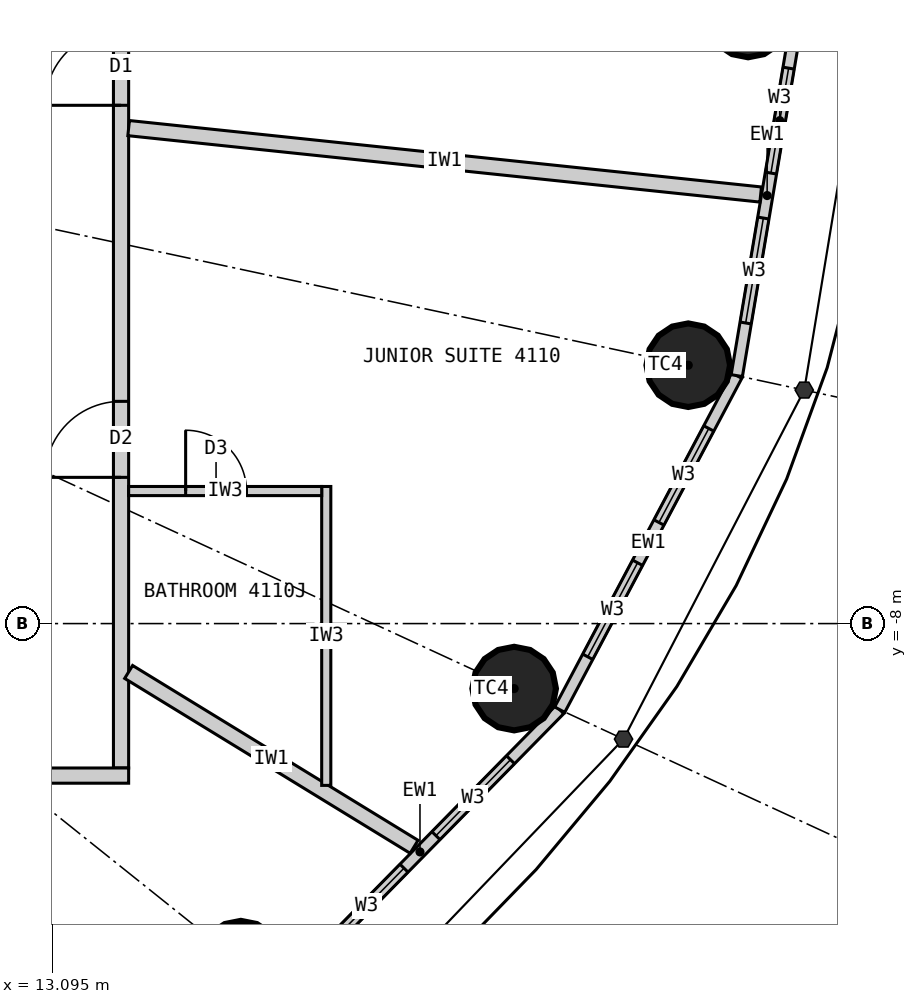
"""IFC4 building model, lengths in metres.
Left out: names, types, materials, properties, quantities, classifications, styles, units other than length and angle.
Written with IfcOpenShell. Run it as: python <this file> out.ifc"""

import sys

from ifc_helpers import new_model, si_unit, direction, frame, frame_2d, origin, origin_2d, place, context, subcontext, project, spatial, rectangle, circle, extrude, element, fill, save


model = new_model("IFC4")
c1 = context("Model", 3, precision=1e-05, world=origin(), true_north=direction((0.0, 1.0)))
c2 = subcontext(c1, "Body", "Model", "MODEL_VIEW")
j1 = project(units=[si_unit("LENGTHUNIT", "METRE"), si_unit("PLANEANGLEUNIT", "RADIAN")], contexts=[c1])
p1 = place(None, origin())
s1 = spatial("IfcSite", under=j1, at=p1, CompositionType="ELEMENT")
p2 = place(p1, origin())
s2 = spatial("IfcBuilding", under=s1, at=p2, CompositionType="ELEMENT")
p3 = place(p2, frame((0.0, 0.0, 156.6)))
s3 = spatial("IfcBuildingStorey", under=s2, at=p3, CompositionType="ELEMENT", Elevation=156.6)
for number, where, z_axis, x_axis in (
    (1, (22.25, 0.0, 0.0), (0.0, 0.0, 1.0), (1.0, 0.0, 0.0)),
    (2, (15.576, -12.461, 0.0), (0.0, 0.0, 1.0), (1.0, 0.0, 0.0)),
    (3, (19.172, -8.855, 0.0), (0.0, 0.0, 1.0), (1.0, 0.0, 0.0)),
    (4, (21.463, -4.601, 0.0), (0.0, 0.0, 1.0), (1.0, 0.0, 0.0)),
):
    element("IfcColumn", number, at=place(p3, frame(where, z_axis=z_axis, x_axis=x_axis)), inside=s3, PredefinedType="COLUMN", context=c2, shape_type="SweptSolid", body=[
        extrude(circle(Radius=0.55, at=origin_2d()), origin(), (0.0, 0.0, 1.0), 3.3),
    ])
p4 = place(p3, frame((16.095, -12.876, 0.0), z_axis=(0.0, 0.0, 1.0), x_axis=(0.700727467776, 0.71342905457, 0.0)))
e5 = element("IfcWall", 5, at=p4, inside=s3, PredefinedType="ELEMENTEDWALL", context=c2, shape_type="SweptSolid", body=[
    extrude(rectangle(XDim=5.247, YDim=0.15, at=frame_2d((2.624, 0.0))), origin(), (0.0, 0.0, 1.0), 3.12),
])
p5 = place(p4, frame((0.924, 0.0, 0.9)))
e6 = element("IfcOpeningElement", 6, at=p5, cuts=e5, PredefinedType="OPENING", context=c2, shape_type="SweptSolid", body=[
    extrude(rectangle(XDim=1.4, YDim=1.9, at=frame_2d((0.7, 0.95))), frame((0.0, 0.085, 0.0), z_axis=(0.0, -1.0, 0.0), x_axis=(1.0, 0.0, 0.0)), (0.0, 0.0, 1.0), 0.17),
])
p6 = place(p4, frame((2.924, 0.0, 0.9)))
e7 = element("IfcOpeningElement", 7, at=p6, cuts=e5, PredefinedType="OPENING", context=c2, shape_type="SweptSolid", body=[
    extrude(rectangle(XDim=1.4, YDim=1.9, at=frame_2d((0.7, 0.95))), frame((0.0, 0.085, 0.0), z_axis=(0.0, -1.0, 0.0), x_axis=(1.0, 0.0, 0.0)), (0.0, 0.0, 1.0), 0.17),
])
p7 = place(p3, frame((19.772, -9.132, 0.0), z_axis=(0.0, 0.0, 1.0), x_axis=(0.468428906714, 0.883501193748, 0.0)))
e8 = element("IfcWall", 8, at=p7, inside=s3, PredefinedType="ELEMENTEDWALL", context=c2, shape_type="SweptSolid", body=[
    extrude(rectangle(XDim=4.974, YDim=0.15, at=frame_2d((2.487, 0.0))), origin(), (0.0, 0.0, 1.0), 3.12),
])
p8 = place(p7, frame((0.787, 0.0, 0.9)))
e9 = element("IfcOpeningElement", 9, at=p8, cuts=e8, PredefinedType="OPENING", context=c2, shape_type="SweptSolid", body=[
    extrude(rectangle(XDim=1.4, YDim=1.9, at=frame_2d((0.7, 0.95))), frame((0.0, 0.085, 0.0), z_axis=(0.0, -1.0, 0.0), x_axis=(1.0, 0.0, 0.0)), (0.0, 0.0, 1.0), 0.17),
])
p9 = place(p7, frame((2.787, 0.0, 0.9)))
e10 = element("IfcOpeningElement", 10, at=p9, cuts=e8, PredefinedType="OPENING", context=c2, shape_type="SweptSolid", body=[
    extrude(rectangle(XDim=1.4, YDim=1.9, at=frame_2d((0.7, 0.95))), frame((0.0, 0.085, 0.0), z_axis=(0.0, -1.0, 0.0), x_axis=(1.0, 0.0, 0.0)), (0.0, 0.0, 1.0), 0.17),
])
p10 = place(p3, frame((22.102, -4.738, 0.0), z_axis=(0.0, 0.0, 1.0), x_axis=(0.166162111254, 0.986098449843, 0.0)))
e11 = element("IfcWall", 11, at=p10, inside=s3, PredefinedType="ELEMENTEDWALL", context=c2, shape_type="SweptSolid", body=[
    extrude(rectangle(XDim=4.805, YDim=0.15, at=frame_2d((2.402, 0.0))), origin(), (0.0, 0.0, 1.0), 3.12),
])
p11 = place(p10, frame((0.702, 0.0, 0.9)))
e12 = element("IfcOpeningElement", 12, at=p11, cuts=e11, PredefinedType="OPENING", context=c2, shape_type="SweptSolid", body=[
    extrude(rectangle(XDim=1.4, YDim=1.9, at=frame_2d((0.7, 0.95))), frame((0.0, 0.085, 0.0), z_axis=(0.0, -1.0, 0.0), x_axis=(1.0, 0.0, 0.0)), (0.0, 0.0, 1.0), 0.17),
])
p12 = place(p10, frame((2.702, 0.0, 0.9)))
e13 = element("IfcOpeningElement", 13, at=p12, cuts=e11, PredefinedType="OPENING", context=c2, shape_type="SweptSolid", body=[
    extrude(rectangle(XDim=1.4, YDim=1.9, at=frame_2d((0.7, 0.95))), frame((0.0, 0.085, 0.0), z_axis=(0.0, -1.0, 0.0), x_axis=(1.0, 0.0, 0.0)), (0.0, 0.0, 1.0), 0.17),
])
p13 = place(p3, frame((14.0, -9.9, 0.0), z_axis=(0.0, 0.0, 1.0), x_axis=(0.0, 1.0, 0.0)))
e14 = element("IfcWall", 14, at=p13, inside=s3, PredefinedType="PARTITIONING", context=c2, shape_type="SweptSolid", body=[
    extrude(rectangle(XDim=19.8, YDim=0.2, at=frame_2d((9.9, 0.0))), origin(), (0.0, 0.0, 1.0), 3.12),
])
p14 = place(p13, frame((3.824, 0.0, 0.0)))
e15 = element("IfcOpeningElement", 15, at=p14, cuts=e14, PredefinedType="OPENING", context=c2, shape_type="SweptSolid", body=[
    extrude(rectangle(XDim=1.0, YDim=2.2, at=frame_2d((0.5, 1.1))), frame((0.0, 0.11, 0.0), z_axis=(0.0, -1.0, 0.0), x_axis=(1.0, 0.0, 0.0)), (0.0, 0.0, 1.0), 0.22),
])
p15 = place(p13, frame((8.719, 0.0, 0.0)))
e16 = element("IfcOpeningElement", 16, at=p15, cuts=e14, PredefinedType="OPENING", context=c2, shape_type="SweptSolid", body=[
    extrude(rectangle(XDim=1.0, YDim=2.2, at=frame_2d((0.5, 1.1))), frame((0.0, 0.11, 0.0), z_axis=(0.0, -1.0, 0.0), x_axis=(1.0, 0.0, 0.0)), (0.0, 0.0, 1.0), 0.22),
])
p16 = place(p13, frame((15.482, 0.0, 0.0)))
e17 = element("IfcOpeningElement", 17, at=p16, cuts=e14, PredefinedType="OPENING", context=c2, shape_type="SweptSolid", body=[
    extrude(rectangle(XDim=1.0, YDim=2.2, at=frame_2d((0.5, 1.1))), frame((0.0, 0.11, 0.0), z_axis=(0.0, -1.0, 0.0), x_axis=(1.0, 0.0, 0.0)), (0.0, 0.0, 1.0), 0.22),
])
p17 = place(p3, frame((14.1, -8.636, 0.0), z_axis=(0.0, 0.0, 1.0), x_axis=(0.852731884196, -0.522348862041, 0.0)))
e18 = element("IfcWall", 18, at=p17, inside=s3, PredefinedType="PARTITIONING", context=c2, shape_type="SweptSolid", body=[
    extrude(rectangle(XDim=4.404, YDim=0.2, at=frame_2d((2.202, 0.0))), origin(), (0.0, 0.0, 1.0), 3.12),
])
p18 = place(p3, frame((14.1, -1.481, 0.0), z_axis=(0.0, 0.0, 1.0), x_axis=(0.994524794819, -0.104500873159, 0.0)))
e19 = element("IfcWall", 19, at=p18, inside=s3, PredefinedType="PARTITIONING", context=c2, shape_type="SweptSolid", body=[
    extrude(rectangle(XDim=8.362, YDim=0.2, at=frame_2d((4.181, 0.0))), origin(), (0.0, 0.0, 1.0), 2.47),
])
p19 = place(p3, frame((16.7, -10.129, 0.0), z_axis=(0.0, 0.0, 1.0), x_axis=(0.0, 1.0, 0.0)))
e20 = element("IfcWall", 20, at=p19, inside=s3, PredefinedType="PARTITIONING", context=c2, shape_type="SweptSolid", body=[
    extrude(rectangle(XDim=3.933, YDim=0.12, at=frame_2d((1.966, 0.0))), origin(), (0.0, 0.0, 1.0), 3.12),
])
p20 = place(p3, frame((14.1, -6.256, 0.0), z_axis=(0.0, 0.0, 1.0), x_axis=(1.0, 0.0, 0.0)))
e21 = element("IfcWall", 21, at=p20, inside=s3, PredefinedType="PARTITIONING", context=c2, shape_type="SweptSolid", body=[
    extrude(rectangle(XDim=2.54, YDim=0.12, at=frame_2d((1.27, 0.0))), origin(), (0.0, 0.0, 1.0), 3.12),
])
p21 = place(p20, frame((0.75, 0.0, 0.0)))
e22 = element("IfcOpeningElement", 22, at=p21, cuts=e21, PredefinedType="OPENING", context=c2, shape_type="SweptSolid", body=[
    extrude(rectangle(XDim=0.8, YDim=2.1, at=frame_2d((0.4, 1.05))), frame((0.0, 0.07, 0.0), z_axis=(0.0, -1.0, 0.0), x_axis=(1.0, 0.0, 0.0)), (0.0, 0.0, 1.0), 0.14),
])
p22 = place(p3, frame((14.1, -10.0, 0.0), z_axis=(0.0, 0.0, 1.0), x_axis=(-1.0, 0.0, 0.0)))
e23 = element("IfcWall", 23, at=p22, inside=s3, PredefinedType="PARTITIONING", context=c2, shape_type="SweptSolid", body=[
    extrude(rectangle(XDim=12.43, YDim=0.2, at=frame_2d((6.215, 0.0))), origin(), (0.0, 0.0, 1.0), 3.12),
])
p23 = place(p22, frame((5.25, 0.0, 0.0)))
e24 = element("IfcOpeningElement", 24, at=p23, cuts=e23, PredefinedType="OPENING", context=c2, shape_type="SweptSolid", body=[
    extrude(rectangle(XDim=1.0, YDim=2.2, at=frame_2d((0.5, 1.1))), frame((0.0, 0.11, 0.0), z_axis=(0.0, -1.0, 0.0), x_axis=(1.0, 0.0, 0.0)), (0.0, 0.0, 1.0), 0.22),
])
p24 = place(p5, origin())
e25 = element("IfcWindow", 25, at=p24, inside=s3, PartitioningType="SINGLE_PANEL", PredefinedType="WINDOW", context=c2, shape_type="SweptSolid", body=[
    extrude(rectangle(XDim=1.4, YDim=1.9, at=frame_2d((0.7, 0.95))), frame((0.0, 0.03, 0.0), z_axis=(0.0, -1.0, 0.0), x_axis=(1.0, 0.0, 0.0)), (0.0, 0.0, 1.0), 0.06),
])
fill(e6, e25)
p25 = place(p6, origin())
e26 = element("IfcWindow", 26, at=p25, inside=s3, PartitioningType="SINGLE_PANEL", PredefinedType="WINDOW", context=c2, shape_type="SweptSolid", body=[
    extrude(rectangle(XDim=1.4, YDim=1.9, at=frame_2d((0.7, 0.95))), frame((0.0, 0.03, 0.0), z_axis=(0.0, -1.0, 0.0), x_axis=(1.0, 0.0, 0.0)), (0.0, 0.0, 1.0), 0.06),
])
fill(e7, e26)
p26 = place(p8, origin())
e27 = element("IfcWindow", 27, at=p26, inside=s3, PartitioningType="SINGLE_PANEL", PredefinedType="WINDOW", context=c2, shape_type="SweptSolid", body=[
    extrude(rectangle(XDim=1.4, YDim=1.9, at=frame_2d((0.7, 0.95))), frame((0.0, 0.03, 0.0), z_axis=(0.0, -1.0, 0.0), x_axis=(1.0, 0.0, 0.0)), (0.0, 0.0, 1.0), 0.06),
])
fill(e9, e27)
p27 = place(p9, origin())
e28 = element("IfcWindow", 28, at=p27, inside=s3, PartitioningType="SINGLE_PANEL", PredefinedType="WINDOW", context=c2, shape_type="SweptSolid", body=[
    extrude(rectangle(XDim=1.4, YDim=1.9, at=frame_2d((0.7, 0.95))), frame((0.0, 0.03, 0.0), z_axis=(0.0, -1.0, 0.0), x_axis=(1.0, 0.0, 0.0)), (0.0, 0.0, 1.0), 0.06),
])
fill(e10, e28)
p28 = place(p11, origin())
e29 = element("IfcWindow", 29, at=p28, inside=s3, PartitioningType="SINGLE_PANEL", PredefinedType="WINDOW", context=c2, shape_type="SweptSolid", body=[
    extrude(rectangle(XDim=1.4, YDim=1.9, at=frame_2d((0.7, 0.95))), frame((0.0, 0.03, 0.0), z_axis=(0.0, -1.0, 0.0), x_axis=(1.0, 0.0, 0.0)), (0.0, 0.0, 1.0), 0.06),
])
fill(e12, e29)
p29 = place(p12, origin())
e30 = element("IfcWindow", 30, at=p29, inside=s3, PartitioningType="SINGLE_PANEL", PredefinedType="WINDOW", context=c2, shape_type="SweptSolid", body=[
    extrude(rectangle(XDim=1.4, YDim=1.9, at=frame_2d((0.7, 0.95))), frame((0.0, 0.03, 0.0), z_axis=(0.0, -1.0, 0.0), x_axis=(1.0, 0.0, 0.0)), (0.0, 0.0, 1.0), 0.06),
])
fill(e13, e30)
p30 = place(p21, origin())
e31 = element("IfcDoor", 31, at=p30, inside=s3, OperationType="SINGLE_SWING_LEFT", PredefinedType="DOOR", context=c2, shape_type="SweptSolid", body=[
    extrude(rectangle(XDim=0.8, YDim=2.1, at=frame_2d((0.4, 1.05))), frame((0.0, 0.025, 0.0), z_axis=(0.0, -1.0, 0.0), x_axis=(1.0, 0.0, 0.0)), (0.0, 0.0, 1.0), 0.05),
])
fill(e22, e31)
p31 = place(p14, origin())
e32 = element("IfcDoor", 32, at=p31, inside=s3, OperationType="SINGLE_SWING_LEFT", PredefinedType="DOOR", context=c2, shape_type="SweptSolid", body=[
    extrude(rectangle(XDim=1.0, YDim=2.2, at=frame_2d((0.5, 1.1))), frame((0.0, 0.025, 0.0), z_axis=(0.0, -1.0, 0.0), x_axis=(1.0, 0.0, 0.0)), (0.0, 0.0, 1.0), 0.05),
])
fill(e15, e32)
p32 = place(p15, origin())
e33 = element("IfcDoor", 33, at=p32, inside=s3, OperationType="SINGLE_SWING_LEFT", PredefinedType="DOOR", context=c2, shape_type="SweptSolid", body=[
    extrude(rectangle(XDim=1.0, YDim=2.2, at=frame_2d((0.5, 1.1))), frame((0.0, 0.025, 0.0), z_axis=(0.0, -1.0, 0.0), x_axis=(1.0, 0.0, 0.0)), (0.0, 0.0, 1.0), 0.05),
])
fill(e16, e33)
save(model, sys.argv[1])
